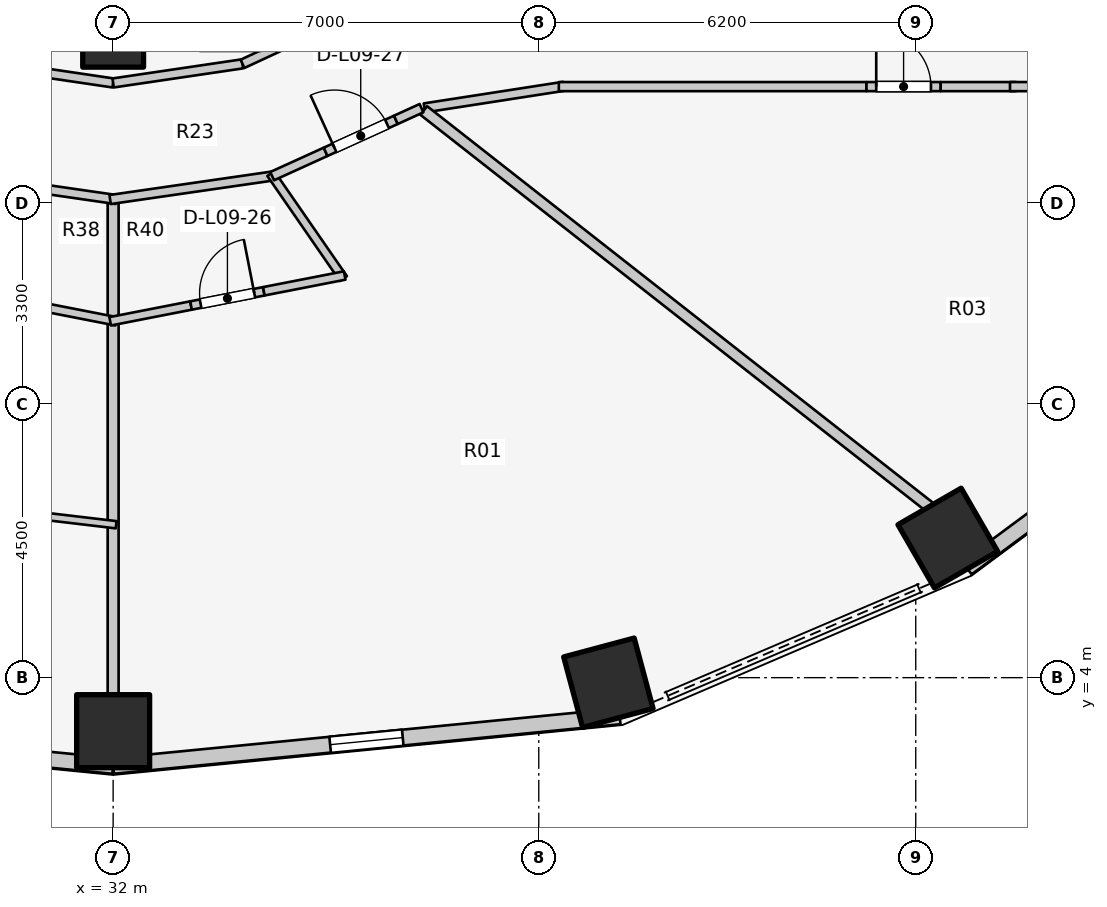
"""IFC4 building model, lengths in metres.
Left out: names, types, materials, properties, quantities, classifications, styles, units other than length and angle.
Written with IfcOpenShell. Run it as: python <this file> out.ifc"""

import sys

from ifc_helpers import new_model, si_unit, direction, frame, frame_2d, origin, origin_2d, place, context, subcontext, project, spatial, rectangle, extrude, element, fill, save


model = new_model("IFC4")
c1 = context("Model", 3, precision=1e-05, world=origin(), true_north=direction((0.0, 1.0)))
c2 = subcontext(c1, "Body", "Model", "MODEL_VIEW")
j1 = project(units=[si_unit("LENGTHUNIT", "METRE"), si_unit("PLANEANGLEUNIT", "RADIAN")], contexts=[c1])
p1 = place(None, origin())
s1 = spatial("IfcSite", under=j1, at=p1, CompositionType="ELEMENT")
p2 = place(p1, origin())
s2 = spatial("IfcBuilding", under=s1, at=p2, CompositionType="ELEMENT")
p3 = place(p2, frame((0.0, 0.0, 33.8)))
s3 = spatial("IfcBuildingStorey", under=s2, at=p3, CompositionType="ELEMENT", Elevation=33.8)
p4 = place(p3, frame((32.0, 14.54, 0.0), z_axis=(0.0, 0.0, 1.0), x_axis=(1.0, 0.0, 0.0)))
e1 = element("IfcColumn", 1, at=p4, inside=s3, PredefinedType="COLUMN", context=c2, shape_type="SweptSolid", body=[
    extrude(rectangle(XDim=1.0, YDim=1.0, at=origin_2d()), origin(), (0.0, 0.0, 1.0), 3.1),
])
for number, where, z_axis, x_axis in (
    (2, (32.0, 3.12, 0.0), (0.0, 0.0, 1.0), (0.0, -1.0, 0.0)),
    (3, (40.145, 3.916, 0.0), (0.0, 0.0, 1.0), (0.259, -0.966, 0.0)),
    (4, (45.727, 6.296, 0.0), (0.0, 0.0, 1.0), (0.5, -0.866, 0.0)),
):
    element("IfcColumn", number, at=place(p3, frame(where, z_axis=z_axis, x_axis=x_axis)), inside=s3, PredefinedType="COLUMN", context=c2, shape_type="SweptSolid", body=[
        extrude(rectangle(XDim=1.2, YDim=1.2, at=origin_2d()), origin(), (0.0, 0.0, 1.0), 3.1),
    ])
p5 = place(p3, frame((23.668, 3.364, 0.0), z_axis=(0.0, 0.0, 1.0), x_axis=(0.995247718352, -0.097375454379, 0.0)))
e5 = element("IfcWall", 5, at=p5, inside=s3, PredefinedType="STANDARD", context=c2, shape_type="SweptSolid", body=[
    extrude(rectangle(XDim=8.372, YDim=0.26, at=frame_2d((4.186, 0.0))), origin(), (0.0, 0.0, 1.0), 1.22),
])
p6 = place(p5, frame((3.586, 0.0, 0.15)))
e6 = element("IfcOpeningElement", 6, at=p6, cuts=e5, PredefinedType="OPENING", context=c2, shape_type="SweptSolid", body=[
    extrude(rectangle(XDim=1.2, YDim=0.9, at=frame_2d((0.6, 0.45))), frame((0.0, 0.14, 0.0), z_axis=(0.0, -1.0, 0.0), x_axis=(1.0, 0.0, 0.0)), (0.0, 0.0, 1.0), 0.28),
])
p7 = place(p3, frame((32.0, 2.549, 0.0), z_axis=(0.0, 0.0, 1.0), x_axis=(0.995247718352, 0.097375454379, 0.0)))
e7 = element("IfcWall", 7, at=p7, inside=s3, PredefinedType="STANDARD", context=c2, shape_type="SweptSolid", body=[
    extrude(rectangle(XDim=8.372, YDim=0.26, at=frame_2d((4.186, 0.0))), origin(), (0.0, 0.0, 1.0), 1.22),
])
p8 = place(p7, frame((3.586, 0.0, 0.15)))
e8 = element("IfcOpeningElement", 8, at=p8, cuts=e7, PredefinedType="OPENING", context=c2, shape_type="SweptSolid", body=[
    extrude(rectangle(XDim=1.2, YDim=0.9, at=frame_2d((0.6, 0.45))), frame((0.0, 0.14, 0.0), z_axis=(0.0, -1.0, 0.0), x_axis=(1.0, 0.0, 0.0)), (0.0, 0.0, 1.0), 0.28),
])
p9 = place(p3, frame((46.042, 5.803, 0.0), z_axis=(0.0, 0.0, 1.0), x_axis=(0.803477531792, 0.595335078679, 0.0)))
e9 = element("IfcWall", 9, at=p9, inside=s3, PredefinedType="STANDARD", context=c2, shape_type="SweptSolid", body=[
    extrude(rectangle(XDim=5.43, YDim=0.26, at=frame_2d((2.715, 0.0))), origin(), (0.0, 0.0, 1.0), 1.22),
])
for number, where, z_axis, x_axis in (
    (10, (29.873, 14.094, 0.0), (0.0, 0.0, 1.0), (0.989, -0.146, 0.0)),
    (11, (32.0, 13.78, 0.0), (0.0, 0.0, 1.0), (0.989, 0.146, 0.0)),
):
    element("IfcWall", number, at=place(p3, frame(where, z_axis=z_axis, x_axis=x_axis)), inside=s3, PredefinedType="PARTITIONING", context=c2, shape_type="SweptSolid", body=[
        extrude(rectangle(XDim=2.151, YDim=0.15, at=frame_2d((1.075, 0.0))), origin(), (0.0, 0.0, 1.0), 1.22),
    ])
p10 = place(p3, frame((34.127, 14.094, 0.0), z_axis=(0.0, 0.0, 1.0), x_axis=(0.906943449489, 0.421252393975, 0.0)))
e12 = element("IfcWall", 12, at=p10, inside=s3, PredefinedType="PARTITIONING", context=c2, shape_type="SweptSolid", body=[
    extrude(rectangle(XDim=2.186, YDim=0.15, at=frame_2d((1.093, 0.0))), origin(), (0.0, 0.0, 1.0), 1.22),
])
p11 = place(p3, frame((37.119, 13.369, 0.0), z_axis=(0.0, 0.0, 1.0), x_axis=(0.988184633586, 0.153268163508, 0.0)))
e13 = element("IfcWall", 13, at=p11, inside=s3, PredefinedType="PARTITIONING", context=c2, shape_type="SweptSolid", body=[
    extrude(rectangle(XDim=2.318, YDim=0.15, at=frame_2d((1.159, 0.0))), origin(), (0.0, 0.0, 1.0), 1.22),
])
p12 = place(p3, frame((39.33, 13.72, 0.0), z_axis=(0.0, 0.0, 1.0), x_axis=(1.0, 0.0, 0.0)))
e14 = element("IfcWall", 14, at=p12, inside=s3, PredefinedType="PARTITIONING", context=c2, shape_type="SweptSolid", body=[
    extrude(rectangle(XDim=5.06, YDim=0.15, at=frame_2d((2.53, 0.0))), origin(), (0.0, 0.0, 1.0), 1.22),
])
p13 = place(p3, frame((44.39, 13.72, 0.0), z_axis=(0.0, 0.0, 1.0), x_axis=(1.0, 0.0, 0.0)))
e15 = element("IfcWall", 15, at=p13, inside=s3, PredefinedType="PARTITIONING", context=c2, shape_type="SweptSolid", body=[
    extrude(rectangle(XDim=1.22, YDim=0.15, at=frame_2d((0.61, 0.0))), origin(), (0.0, 0.0, 1.0), 2.575),
])
p14 = place(p13, frame((0.16, 0.0, 0.0)))
e16 = element("IfcOpeningElement", 16, at=p14, cuts=e15, PredefinedType="OPENING", context=c2, shape_type="SweptSolid", body=[
    extrude(rectangle(XDim=0.9, YDim=2.1, at=frame_2d((0.45, 1.05))), frame((0.0, 0.085, 0.0), z_axis=(0.0, -1.0, 0.0), x_axis=(1.0, 0.0, 0.0)), (0.0, 0.0, 1.0), 0.17),
])
p15 = place(p3, frame((45.61, 13.72, 0.0), z_axis=(0.0, 0.0, 1.0), x_axis=(1.0, 0.0, 0.0)))
e17 = element("IfcWall", 17, at=p15, inside=s3, PredefinedType="PARTITIONING", context=c2, shape_type="SweptSolid", body=[
    extrude(rectangle(XDim=1.24, YDim=0.15, at=frame_2d((0.62, 0.0))), origin(), (0.0, 0.0, 1.0), 2.575),
])
p16 = place(p3, frame((46.75, 13.72, 0.0), z_axis=(0.0, 0.0, 1.0), x_axis=(1.0, 0.0, 0.0)))
e18 = element("IfcWall", 18, at=p16, inside=s3, PredefinedType="PARTITIONING", context=c2, shape_type="SweptSolid", body=[
    extrude(rectangle(XDim=5.05, YDim=0.15, at=frame_2d((2.525, 0.0))), origin(), (0.0, 0.0, 1.0), 1.22),
])
p17 = place(p3, frame((32.0, 11.815, 0.0), z_axis=(0.0, 0.0, 1.0), x_axis=(0.0, -1.0, 0.0)))
e19 = element("IfcWall", 19, at=p17, inside=s3, PredefinedType="PARTITIONING", context=c2, shape_type="SweptSolid", body=[
    extrude(rectangle(XDim=8.115, YDim=0.18, at=frame_2d((4.058, 0.0))), origin(), (0.0, 0.0, 1.0), 1.22),
])
p18 = place(p3, frame((37.108, 13.327, 0.0), z_axis=(0.0, 0.0, 1.0), x_axis=(0.78700868866, -0.616941912966, 0.0)))
e20 = element("IfcWall", 20, at=p18, inside=s3, PredefinedType="PARTITIONING", context=c2, shape_type="SweptSolid", body=[
    extrude(rectangle(XDim=10.583, YDim=0.18, at=frame_2d((5.292, 0.0))), origin(), (0.0, 0.0, 1.0), 1.22),
])
p19 = place(p3, frame((30.121, 6.743, 0.0), z_axis=(0.0, 0.0, 1.0), x_axis=(0.993052427277, -0.117672752492, 0.0)))
e21 = element("IfcWall", 21, at=p19, inside=s3, PredefinedType="MOVABLE", context=c2, shape_type="SweptSolid", body=[
    extrude(rectangle(XDim=1.942, YDim=0.12, at=frame_2d((0.971, 0.0))), origin(), (0.0, 0.0, 1.0), 1.22),
])
p20 = place(p3, frame((29.329, 12.256, 0.0), z_axis=(0.0, 0.0, 1.0), x_axis=(0.989701115085, -0.143149232617, 0.0)))
e22 = element("IfcWall", 22, at=p20, inside=s3, PredefinedType="PARTITIONING", context=c2, shape_type="SweptSolid", body=[
    extrude(rectangle(XDim=2.749, YDim=0.15, at=frame_2d((1.375, 0.0))), origin(), (0.0, 0.0, 1.0), 1.22),
])
p21 = place(p3, frame((30.719, 10.12, 0.0), z_axis=(0.0, 0.0, 1.0), x_axis=(0.981450920641, -0.191713563349, 0.0)))
e23 = element("IfcWall", 23, at=p21, inside=s3, PredefinedType="PLUMBINGWALL", context=c2, shape_type="SweptSolid", body=[
    extrude(rectangle(XDim=1.355, YDim=0.14, at=frame_2d((0.677, 0.0))), origin(), (0.0, 0.0, 1.0), 1.22),
])
p22 = place(p3, frame((31.95, 11.863, 0.0), z_axis=(0.0, 0.0, 1.0), x_axis=(0.989701115085, 0.143149232617, 0.0)))
e24 = element("IfcWall", 24, at=p22, inside=s3, PredefinedType="PARTITIONING", context=c2, shape_type="SweptSolid", body=[
    extrude(rectangle(XDim=2.749, YDim=0.15, at=frame_2d((1.375, 0.0))), origin(), (0.0, 0.0, 1.0), 1.22),
])
p23 = place(p3, frame((34.594, 12.29, 0.0), z_axis=(0.0, 0.0, 1.0), x_axis=(0.568653635333, -0.822577074214, 0.0)))
e25 = element("IfcWall", 25, at=p23, inside=s3, PredefinedType="PLUMBINGWALL", context=c2, shape_type="SweptSolid", body=[
    extrude(rectangle(XDim=2.1, YDim=0.14, at=frame_2d((1.05, 0.0))), origin(), (0.0, 0.0, 1.0), 1.22),
])
p24 = place(p3, frame((31.951, 9.86, 0.0), z_axis=(0.0, 0.0, 1.0), x_axis=(0.981457541308, 0.191679666658, 0.0)))
e26 = element("IfcWall", 26, at=p24, inside=s3, PredefinedType="PLUMBINGWALL", context=c2, shape_type="SweptSolid", body=[
    extrude(rectangle(XDim=1.355, YDim=0.14, at=frame_2d((0.678, 0.0))), origin(), (0.0, 0.0, 1.0), 1.22),
])
p25 = place(p3, frame((33.281, 10.12, 0.0), z_axis=(0.0, 0.0, 1.0), x_axis=(0.981448362659, 0.191726658121, 0.0)))
e27 = element("IfcWall", 27, at=p25, inside=s3, PredefinedType="PLUMBINGWALL", context=c2, shape_type="SweptSolid", body=[
    extrude(rectangle(XDim=1.22, YDim=0.14, at=frame_2d((0.61, 0.0))), origin(), (0.0, 0.0, 1.0), 2.575),
])
p26 = place(p25, frame((0.16, 0.0, 0.0)))
e28 = element("IfcOpeningElement", 28, at=p26, cuts=e27, PredefinedType="OPENING", context=c2, shape_type="SweptSolid", body=[
    extrude(rectangle(XDim=0.9, YDim=2.1, at=frame_2d((0.45, 1.05))), frame((0.0, 0.08, 0.0), z_axis=(0.0, -1.0, 0.0), x_axis=(1.0, 0.0, 0.0)), (0.0, 0.0, 1.0), 0.16),
])
p27 = place(p3, frame((34.478, 10.354, 0.0), z_axis=(0.0, 0.0, 1.0), x_axis=(0.981484809036, 0.191539994861, 0.0)))
e29 = element("IfcWall", 29, at=p27, inside=s3, PredefinedType="PLUMBINGWALL", context=c2, shape_type="SweptSolid", body=[
    extrude(rectangle(XDim=1.355, YDim=0.14, at=frame_2d((0.677, 0.0))), origin(), (0.0, 0.0, 1.0), 1.22),
])
p28 = place(p3, frame((34.615, 12.247, 0.0), z_axis=(0.0, 0.0, 1.0), x_axis=(0.910210554917, 0.414145802487, 0.0)))
e30 = element("IfcWall", 30, at=p28, inside=s3, PredefinedType="PARTITIONING", context=c2, shape_type="SweptSolid", body=[
    extrude(rectangle(XDim=0.966, YDim=0.15, at=frame_2d((0.483, 0.0))), origin(), (0.0, 0.0, 1.0), 1.22),
])
p29 = place(p3, frame((35.494, 12.647, 0.0), z_axis=(0.0, 0.0, 1.0), x_axis=(0.910168885926, 0.414237370469, 0.0)))
e31 = element("IfcWall", 31, at=p29, inside=s3, PredefinedType="PARTITIONING", context=c2, shape_type="SweptSolid", body=[
    extrude(rectangle(XDim=1.27, YDim=0.15, at=frame_2d((0.635, 0.0))), origin(), (0.0, 0.0, 1.0), 2.16),
])
p30 = place(p29, frame((0.16, 0.0, 0.0)))
e32 = element("IfcOpeningElement", 32, at=p30, cuts=e31, PredefinedType="OPENING", context=c2, shape_type="SweptSolid", body=[
    extrude(rectangle(XDim=0.95, YDim=2.1, at=frame_2d((0.475, 1.05))), frame((0.0, 0.085, 0.0), z_axis=(0.0, -1.0, 0.0), x_axis=(1.0, 0.0, 0.0)), (0.0, 0.0, 1.0), 0.17),
])
p31 = place(p3, frame((36.65, 13.173, 0.0), z_axis=(0.0, 0.0, 1.0), x_axis=(0.910185690705, 0.414200444756, 0.0)))
e33 = element("IfcWall", 33, at=p31, inside=s3, PredefinedType="PARTITIONING", context=c2, shape_type="SweptSolid", body=[
    extrude(rectangle(XDim=0.463, YDim=0.15, at=frame_2d((0.231, 0.0))), origin(), (0.0, 0.0, 1.0), 2.575),
])
p32 = place(p8, origin())
e34 = element("IfcWindow", 34, at=p32, inside=s3, PartitioningType="SINGLE_PANEL", PredefinedType="WINDOW", context=c2, shape_type="SweptSolid", body=[
    extrude(rectangle(XDim=1.2, YDim=0.9, at=frame_2d((0.6, 0.45))), frame((0.0, 0.03, 0.0), z_axis=(0.0, -1.0, 0.0), x_axis=(1.0, 0.0, 0.0)), (0.0, 0.0, 1.0), 0.06),
])
fill(e8, e34)
p33 = place(p14, origin())
e35 = element("IfcDoor", 35, at=p33, inside=s3, OperationType="SINGLE_SWING_LEFT", PredefinedType="DOOR", context=c2, shape_type="SweptSolid", body=[
    extrude(rectangle(XDim=0.9, YDim=2.1, at=frame_2d((0.45, 1.05))), frame((0.0, 0.025, 0.0), z_axis=(0.0, -1.0, 0.0), x_axis=(1.0, 0.0, 0.0)), (0.0, 0.0, 1.0), 0.05),
])
fill(e16, e35)
p34 = place(p26, origin())
e36 = element("IfcDoor", 36, at=p34, inside=s3, OperationType="SINGLE_SWING_RIGHT", PredefinedType="DOOR", context=c2, shape_type="SweptSolid", body=[
    extrude(rectangle(XDim=0.9, YDim=2.1, at=frame_2d((0.45, 1.05))), frame((0.0, 0.025, 0.0), z_axis=(0.0, -1.0, 0.0), x_axis=(1.0, 0.0, 0.0)), (0.0, 0.0, 1.0), 0.05),
])
fill(e28, e36)
p35 = place(p30, origin())
e37 = element("IfcDoor", 37, at=p35, inside=s3, OperationType="SINGLE_SWING_LEFT", PredefinedType="DOOR", context=c2, shape_type="SweptSolid", body=[
    extrude(rectangle(XDim=0.95, YDim=2.1, at=frame_2d((0.475, 1.05))), frame((0.0, 0.025, 0.0), z_axis=(0.0, -1.0, 0.0), x_axis=(1.0, 0.0, 0.0)), (0.0, 0.0, 1.0), 0.05),
])
fill(e32, e37)
save(model, sys.argv[1])
